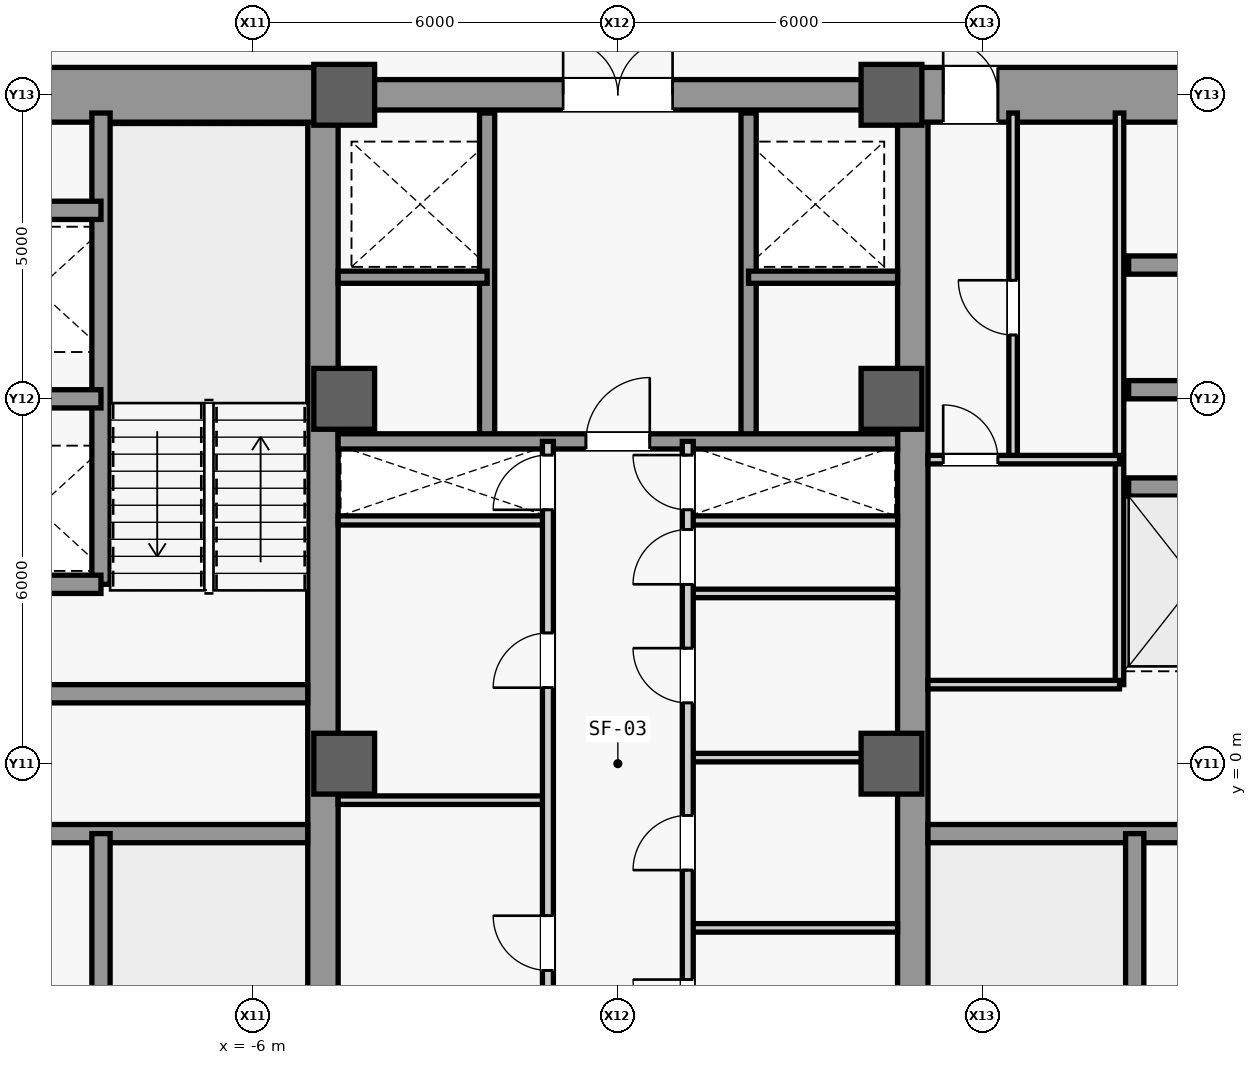
"""IFC4 building model, lengths in metres.
Left out: names, types, materials, properties, quantities, classifications, styles, units other than length and angle.
Written with IfcOpenShell. Run it as: python <this file> out.ifc"""

import sys

from ifc_helpers import new_model, si_unit, direction, frame, frame_2d, origin, origin_2d, place, context, subcontext, project, spatial, rectangle, extrude, source, transform, mapped, element, fill, save


model = new_model("IFC4")
c1 = context("Model", 3, precision=1e-05, world=origin(), true_north=direction((0.0, 1.0)))
c2 = subcontext(c1, "Body", "Model", "MODEL_VIEW")
j1 = project(units=[si_unit("LENGTHUNIT", "METRE"), si_unit("PLANEANGLEUNIT", "RADIAN")], contexts=[c1])
p1 = place(None, origin())
s1 = spatial("IfcSite", under=j1, at=p1, CompositionType="ELEMENT")
p2 = place(p1, origin())
s2 = spatial("IfcBuilding", under=s1, at=p2, CompositionType="ELEMENT")
p3 = place(p2, frame((0.0, 0.0, 70.4)))
s3 = spatial("IfcBuildingStorey", under=s2, at=p3, CompositionType="ELEMENT", Elevation=70.4)
m1 = source(origin(), c2, "Body", "SweptSolid", [
    extrude(rectangle(XDim=21.4, YDim=0.5, at=frame_2d((10.7, 0.0))), origin(), (0.0, 0.0, 1.0), 3.94),
])
for number, where, z_axis, x_axis in (
    (1, (-4.85, -10.7, 0.0), (0.0, 0.0, 1.0), (0.0, 1.0, 0.0)),
    (2, (4.85, -10.7, 0.0), (0.0, 0.0, 1.0), (0.0, 1.0, 0.0)),
):
    element("IfcWall", number, at=place(p3, frame(where, z_axis=z_axis, x_axis=x_axis)), inside=s3, PredefinedType="SHEAR", context=c2, shape_type="MappedRepresentation", body=[
        mapped(m1, transform((0.0, 0.0, 0.0), scale=1.0)),
    ])
m2 = source(origin(), c2, "Body", "SweptSolid", [
    extrude(rectangle(XDim=5.85, YDim=0.9, at=frame_2d((2.925, 0.0))), origin(), (0.0, 0.0, 1.0), 3.94),
])
p4 = place(p3, frame((-10.7, 11.0, 0.0), z_axis=(0.0, 0.0, 1.0), x_axis=(1.0, 0.0, 0.0)))
e3 = element("IfcWall", 3, at=p4, inside=s3, PredefinedType="SHEAR", context=c2, shape_type="MappedRepresentation", body=[
    mapped(m2, transform((0.0, 0.0, 0.0), scale=1.0)),
])
p5 = place(p3, frame((4.85, 11.0, 0.0), z_axis=(0.0, 0.0, 1.0), x_axis=(1.0, 0.0, 0.0)))
e4 = element("IfcWall", 4, at=p5, inside=s3, PredefinedType="SHEAR", context=c2, shape_type="MappedRepresentation", body=[
    mapped(m2, transform((0.0, 0.0, 0.0), scale=1.0)),
])
m3 = source(origin(), c2, "Body", "SweptSolid", [
    extrude(rectangle(XDim=0.9, YDim=2.15, at=frame_2d((0.45, 1.075))), frame((0.0, 0.46, 0.0), z_axis=(0.0, -1.0, 0.0), x_axis=(1.0, 0.0, 0.0)), (0.0, 0.0, 1.0), 0.92),
])
p6 = place(p5, frame((0.5, 0.0, 0.0)))
e5 = element("IfcOpeningElement", 5, at=p6, cuts=e4, PredefinedType="OPENING", context=c2, shape_type="MappedRepresentation", body=[
    mapped(m3, transform((0.0, 0.0, 0.0), scale=1.0)),
])
m4 = source(origin(), c2, "Body", "SweptSolid", [
    extrude(rectangle(XDim=5.6, YDim=0.3, at=frame_2d((2.8, 0.0))), origin(), (0.0, 0.0, 1.0), 3.94),
])
for number, where, z_axis, x_axis in (
    (6, (-10.7, -1.15, 0.0), (0.0, 0.0, 1.0), (1.0, 0.0, 0.0)),
    (7, (-10.7, 1.15, 0.0), (0.0, 0.0, 1.0), (1.0, 0.0, 0.0)),
    (8, (5.1, -1.15, 0.0), (0.0, 0.0, 1.0), (1.0, 0.0, 0.0)),
):
    element("IfcWall", number, at=place(p3, frame(where, z_axis=z_axis, x_axis=x_axis)), inside=s3, PredefinedType="SHEAR", context=c2, shape_type="MappedRepresentation", body=[
        mapped(m4, transform((0.0, 0.0, 0.0), scale=1.0)),
    ])
m5 = source(origin(), c2, "Body", "SweptSolid", [
    extrude(rectangle(XDim=9.2, YDim=0.5, at=frame_2d((4.6, 0.0))), origin(), (0.0, 0.0, 1.0), 3.94),
])
p7 = place(p3, frame((-4.6, 11.0, 0.0), z_axis=(0.0, 0.0, 1.0), x_axis=(1.0, 0.0, 0.0)))
e9 = element("IfcWall", 9, at=p7, inside=s3, PredefinedType="SHEAR", context=c2, shape_type="MappedRepresentation", body=[
    mapped(m5, transform((0.0, 0.0, 0.0), scale=1.0)),
])
m6 = source(origin(), c2, "Body", "SweptSolid", [
    extrude(rectangle(XDim=1.8, YDim=2.25, at=frame_2d((0.9, 1.125))), frame((0.0, 0.26, 0.0), z_axis=(0.0, -1.0, 0.0), x_axis=(1.0, 0.0, 0.0)), (0.0, 0.0, 1.0), 0.52),
])
p8 = place(p7, frame((3.7, 0.0, 0.0)))
e10 = element("IfcOpeningElement", 10, at=p8, cuts=e9, PredefinedType="OPENING", context=c2, shape_type="MappedRepresentation", body=[
    mapped(m6, transform((0.0, 0.0, 0.0), scale=1.0)),
])
m7 = source(origin(), c2, "Body", "SweptSolid", [
    extrude(rectangle(XDim=1.0, YDim=1.0, at=origin_2d()), origin(), (0.0, 0.0, 1.0), 4.2),
])
for number, where, z_axis, x_axis in (
    (11, (-4.5, 0.0, 0.0), (0.0, 0.0, 1.0), (1.0, 0.0, 0.0)),
    (12, (-4.5, 6.0, 0.0), (0.0, 0.0, 1.0), (1.0, 0.0, 0.0)),
    (13, (-4.5, 11.0, 0.0), (0.0, 0.0, 1.0), (1.0, 0.0, 0.0)),
    (14, (4.5, 0.0, 0.0), (0.0, 0.0, 1.0), (1.0, 0.0, 0.0)),
    (15, (4.5, 6.0, 0.0), (0.0, 0.0, 1.0), (1.0, 0.0, 0.0)),
    (16, (4.5, 11.0, 0.0), (0.0, 0.0, 1.0), (1.0, 0.0, 0.0)),
):
    element("IfcColumn", number, at=place(p3, frame(where, z_axis=z_axis, x_axis=x_axis)), inside=s3, PredefinedType="COLUMN", context=c2, shape_type="MappedRepresentation", body=[
        mapped(m7, transform((0.0, 0.0, 0.0), scale=1.0)),
    ])
m8 = source(origin(), c2, "Body", "SweptSolid", [
    extrude(rectangle(XDim=7.8, YDim=0.3, at=frame_2d((3.9, 0.0))), origin(), (0.0, 0.0, 1.0), 3.94),
])
p9 = place(p3, frame((-8.5, -8.95, 0.0), z_axis=(0.0, 0.0, 1.0), x_axis=(0.0, 1.0, 0.0)))
e17 = element("IfcWall", 17, at=p9, inside=s3, PredefinedType="SHEAR", context=c2, shape_type="MappedRepresentation", body=[
    mapped(m8, transform((0.0, 0.0, 0.0), scale=1.0)),
])
m9 = source(origin(), c2, "Body", "SweptSolid", [
    extrude(rectangle(XDim=7.75, YDim=0.3, at=frame_2d((3.875, 0.0))), origin(), (0.0, 0.0, 1.0), 3.94),
])
p10 = place(p3, frame((-8.5, 2.95, 0.0), z_axis=(0.0, 0.0, 1.0), x_axis=(0.0, 1.0, 0.0)))
e18 = element("IfcWall", 18, at=p10, inside=s3, PredefinedType="SHEAR", context=c2, shape_type="MappedRepresentation", body=[
    mapped(m9, transform((0.0, 0.0, 0.0), scale=1.0)),
])
m10 = source(origin(), c2, "Body", "SweptSolid", [
    extrude(rectangle(XDim=2.2, YDim=0.3, at=frame_2d((1.1, 0.0))), origin(), (0.0, 0.0, 1.0), 3.94),
])
for number, where, z_axis, x_axis in (
    (19, (-10.7, 2.95, 0.0), (0.0, 0.0, 1.0), (1.0, 0.0, 0.0)),
    (20, (-10.7, 6.0, 0.0), (0.0, 0.0, 1.0), (1.0, 0.0, 0.0)),
    (21, (-10.7, 9.1, 0.0), (0.0, 0.0, 1.0), (1.0, 0.0, 0.0)),
):
    element("IfcWall", number, at=place(p3, frame(where, z_axis=z_axis, x_axis=x_axis)), inside=s3, PredefinedType="SHEAR", context=c2, shape_type="MappedRepresentation", body=[
        mapped(m10, transform((0.0, 0.0, 0.0), scale=1.0)),
    ])
p11 = place(p3, frame((8.5, -8.95, 0.0), z_axis=(0.0, 0.0, 1.0), x_axis=(0.0, 1.0, 0.0)))
e22 = element("IfcWall", 22, at=p11, inside=s3, PredefinedType="SHEAR", context=c2, shape_type="MappedRepresentation", body=[
    mapped(m8, transform((0.0, 0.0, 0.0), scale=1.0)),
])
m11 = source(origin(), c2, "Body", "SweptSolid", [
    extrude(rectangle(XDim=2.3, YDim=0.3, at=frame_2d((1.15, 0.0))), origin(), (0.0, 0.0, 1.0), 3.94),
])
for number, where, z_axis, x_axis in (
    (23, (8.4, 4.55, 0.0), (0.0, 0.0, 1.0), (1.0, 0.0, 0.0)),
    (24, (8.4, 6.15, 0.0), (0.0, 0.0, 1.0), (1.0, 0.0, 0.0)),
    (25, (8.4, 8.2, 0.0), (0.0, 0.0, 1.0), (1.0, 0.0, 0.0)),
):
    element("IfcWall", number, at=place(p3, frame(where, z_axis=z_axis, x_axis=x_axis)), inside=s3, PredefinedType="SHEAR", context=c2, shape_type="MappedRepresentation", body=[
        mapped(m11, transform((0.0, 0.0, 0.0), scale=1.0)),
    ])
m12 = source(origin(), c2, "Body", "SweptSolid", [
    extrude(rectangle(XDim=9.4, YDim=0.14, at=frame_2d((4.7, 0.0))), origin(), (0.0, 0.0, 1.0), 3.94),
])
p12 = place(p3, frame((8.25, 1.3, 0.0), z_axis=(0.0, 0.0, 1.0), x_axis=(0.0, 1.0, 0.0)))
e26 = element("IfcWall", 26, at=p12, inside=s3, PredefinedType="PARTITIONING", context=c2, shape_type="MappedRepresentation", body=[
    mapped(m12, transform((0.0, 0.0, 0.0), scale=1.0)),
])
m13 = source(origin(), c2, "Body", "SweptSolid", [
    extrude(rectangle(XDim=3.15, YDim=0.14, at=frame_2d((1.575, 0.0))), origin(), (0.0, 0.0, 1.0), 3.94),
])
p13 = place(p3, frame((5.1, 1.3, 0.0), z_axis=(0.0, 0.0, 1.0), x_axis=(1.0, 0.0, 0.0)))
e27 = element("IfcWall", 27, at=p13, inside=s3, PredefinedType="PARTITIONING", context=c2, shape_type="MappedRepresentation", body=[
    mapped(m13, transform((0.0, 0.0, 0.0), scale=1.0)),
])
m14 = source(origin(), c2, "Body", "SweptSolid", [
    extrude(rectangle(XDim=5.7, YDim=0.14, at=frame_2d((2.85, 0.0))), origin(), (0.0, 0.0, 1.0), 3.94),
])
p14 = place(p3, frame((6.5, 5.0, 0.0), z_axis=(0.0, 0.0, 1.0), x_axis=(0.0, 1.0, 0.0)))
e28 = element("IfcWall", 28, at=p14, inside=s3, PredefinedType="PARTITIONING", context=c2, shape_type="MappedRepresentation", body=[
    mapped(m14, transform((0.0, 0.0, 0.0), scale=1.0)),
])
m15 = source(origin(), c2, "Body", "SweptSolid", [
    extrude(rectangle(XDim=0.9, YDim=2.15, at=frame_2d((0.45, 1.075))), frame((0.0, 0.08, 0.0), z_axis=(0.0, -1.0, 0.0), x_axis=(1.0, 0.0, 0.0)), (0.0, 0.0, 1.0), 0.16),
])
p15 = place(p14, frame((2.05, 0.0, 0.0)))
e29 = element("IfcOpeningElement", 29, at=p15, cuts=e28, PredefinedType="OPENING", context=c2, shape_type="MappedRepresentation", body=[
    mapped(m15, transform((0.0, 0.0, 0.0), scale=1.0)),
])
p16 = place(p3, frame((5.1, 5.0, 0.0), z_axis=(0.0, 0.0, 1.0), x_axis=(1.0, 0.0, 0.0)))
e30 = element("IfcWall", 30, at=p16, inside=s3, PredefinedType="PARTITIONING", context=c2, shape_type="MappedRepresentation", body=[
    mapped(m13, transform((0.0, 0.0, 0.0), scale=1.0)),
])
p17 = place(p16, frame((0.25, 0.0, 0.0)))
e31 = element("IfcOpeningElement", 31, at=p17, cuts=e30, PredefinedType="OPENING", context=c2, shape_type="MappedRepresentation", body=[
    mapped(m15, transform((0.0, 0.0, 0.0), scale=1.0)),
])
m16 = source(origin(), c2, "Body", "SweptSolid", [
    extrude(rectangle(XDim=3.45, YDim=0.15, at=frame_2d((1.725, 0.0))), origin(), (0.0, 0.0, 1.0), 3.94),
])
for number, where, z_axis, x_axis in (
    (32, (-4.6, 4.0, 0.0), (0.0, 0.0, 1.0), (1.0, 0.0, 0.0)),
    (33, (1.15, 4.0, 0.0), (0.0, 0.0, 1.0), (1.0, 0.0, 0.0)),
):
    element("IfcWall", number, at=place(p3, frame(where, z_axis=z_axis, x_axis=x_axis)), inside=s3, PredefinedType="PARTITIONING", context=c2, shape_type="MappedRepresentation", body=[
        mapped(m16, transform((0.0, 0.0, 0.0), scale=1.0)),
    ])
m17 = source(origin(), c2, "Body", "SweptSolid", [
    extrude(rectangle(XDim=5.4, YDim=0.25, at=frame_2d((2.7, 0.0))), origin(), (0.0, 0.0, 1.0), 3.94),
])
for number, where, z_axis, x_axis in (
    (34, (-2.15, 5.3, 0.0), (0.0, 0.0, 1.0), (0.0, 1.0, 0.0)),
    (35, (2.15, 5.3, 0.0), (0.0, 0.0, 1.0), (0.0, 1.0, 0.0)),
):
    element("IfcWall", number, at=place(p3, frame(where, z_axis=z_axis, x_axis=x_axis)), inside=s3, PredefinedType="SHEAR", context=c2, shape_type="MappedRepresentation", body=[
        mapped(m17, transform((0.0, 0.0, 0.0), scale=1.0)),
    ])
m18 = source(origin(), c2, "Body", "SweptSolid", [
    extrude(rectangle(XDim=2.45, YDim=0.2, at=frame_2d((1.225, 0.0))), origin(), (0.0, 0.0, 1.0), 3.94),
])
for number, where, z_axis, x_axis in (
    (36, (-4.6, 8.0, 0.0), (0.0, 0.0, 1.0), (1.0, 0.0, 0.0)),
    (37, (2.15, 8.0, 0.0), (0.0, 0.0, 1.0), (1.0, 0.0, 0.0)),
):
    element("IfcWall", number, at=place(p3, frame(where, z_axis=z_axis, x_axis=x_axis)), inside=s3, PredefinedType="SHEAR", context=c2, shape_type="MappedRepresentation", body=[
        mapped(m18, transform((0.0, 0.0, 0.0), scale=1.0)),
    ])
m19 = source(origin(), c2, "Body", "SweptSolid", [
    extrude(rectangle(XDim=9.2, YDim=0.25, at=frame_2d((4.6, 0.0))), origin(), (0.0, 0.0, 1.0), 3.94),
])
p18 = place(p3, frame((-4.6, 5.3, 0.0), z_axis=(0.0, 0.0, 1.0), x_axis=(1.0, 0.0, 0.0)))
e38 = element("IfcWall", 38, at=p18, inside=s3, PredefinedType="SHEAR", context=c2, shape_type="MappedRepresentation", body=[
    mapped(m19, transform((0.0, 0.0, 0.0), scale=1.0)),
])
m20 = source(origin(), c2, "Body", "SweptSolid", [
    extrude(rectangle(XDim=1.05, YDim=2.2, at=frame_2d((0.525, 1.1))), frame((0.0, 0.135, 0.0), z_axis=(0.0, -1.0, 0.0), x_axis=(1.0, 0.0, 0.0)), (0.0, 0.0, 1.0), 0.27),
])
p19 = place(p18, frame((4.075, 0.0, 0.0)))
e39 = element("IfcOpeningElement", 39, at=p19, cuts=e38, PredefinedType="OPENING", context=c2, shape_type="MappedRepresentation", body=[
    mapped(m20, transform((0.0, 0.0, 0.0), scale=1.0)),
])
m21 = source(origin(), c2, "Body", "SweptSolid", [
    extrude(rectangle(XDim=3.45, YDim=0.14, at=frame_2d((1.725, 0.0))), origin(), (0.0, 0.0, 1.0), 3.94),
])
p20 = place(p3, frame((-4.6, -0.6, 0.0), z_axis=(0.0, 0.0, 1.0), x_axis=(1.0, 0.0, 0.0)))
e40 = element("IfcWall", 40, at=p20, inside=s3, PredefinedType="PARTITIONING", context=c2, shape_type="MappedRepresentation", body=[
    mapped(m21, transform((0.0, 0.0, 0.0), scale=1.0)),
])
m22 = source(origin(), c2, "Body", "SweptSolid", [
    extrude(rectangle(XDim=10.6, YDim=0.18, at=frame_2d((5.3, 0.0))), origin(), (0.0, 0.0, 1.0), 3.94),
])
p21 = place(p3, frame((-1.15, -5.3, 0.0), z_axis=(0.0, 0.0, 1.0), x_axis=(0.0, 1.0, 0.0)))
e41 = element("IfcWall", 41, at=p21, inside=s3, PredefinedType="PARTITIONING", context=c2, shape_type="MappedRepresentation", body=[
    mapped(m22, transform((0.0, 0.0, 0.0), scale=1.0)),
])
m23 = source(origin(), c2, "Body", "SweptSolid", [
    extrude(rectangle(XDim=0.9, YDim=2.15, at=frame_2d((0.45, 1.075))), frame((0.0, 0.1, 0.0), z_axis=(0.0, -1.0, 0.0), x_axis=(1.0, 0.0, 0.0)), (0.0, 0.0, 1.0), 0.2),
])
p22 = place(p21, frame((1.9, 0.0, 0.0)))
e42 = element("IfcOpeningElement", 42, at=p22, cuts=e41, PredefinedType="OPENING", context=c2, shape_type="MappedRepresentation", body=[
    mapped(m23, transform((0.0, 0.0, 0.0), scale=1.0)),
])
p23 = place(p21, frame((6.55, 0.0, 0.0)))
e43 = element("IfcOpeningElement", 43, at=p23, cuts=e41, PredefinedType="OPENING", context=c2, shape_type="MappedRepresentation", body=[
    mapped(m23, transform((0.0, 0.0, 0.0), scale=1.0)),
])
p24 = place(p21, frame((9.475, 0.0, 0.0)))
e44 = element("IfcOpeningElement", 44, at=p24, cuts=e41, PredefinedType="OPENING", context=c2, shape_type="MappedRepresentation", body=[
    mapped(m23, transform((0.0, 0.0, 0.0), scale=1.0)),
])
p25 = place(p3, frame((1.15, -2.7, 0.0), z_axis=(0.0, 0.0, 1.0), x_axis=(1.0, 0.0, 0.0)))
e45 = element("IfcWall", 45, at=p25, inside=s3, PredefinedType="PARTITIONING", context=c2, shape_type="MappedRepresentation", body=[
    mapped(m21, transform((0.0, 0.0, 0.0), scale=1.0)),
])
m24 = source(origin(), c2, "Body", "SweptSolid", [
    extrude(rectangle(XDim=3.45, YDim=0.14, at=frame_2d((1.725, 0.0))), origin(), (0.0, 0.0, 1.0), 3.245),
])
p26 = place(p3, frame((1.15, 0.1, 0.0), z_axis=(0.0, 0.0, 1.0), x_axis=(1.0, 0.0, 0.0)))
e46 = element("IfcWall", 46, at=p26, inside=s3, PredefinedType="PARTITIONING", context=c2, shape_type="MappedRepresentation", body=[
    mapped(m24, transform((0.0, 0.0, 0.0), scale=1.0)),
])
p27 = place(p3, frame((1.15, 2.8, 0.0), z_axis=(0.0, 0.0, 1.0), x_axis=(1.0, 0.0, 0.0)))
e47 = element("IfcWall", 47, at=p27, inside=s3, PredefinedType="PARTITIONING", context=c2, shape_type="MappedRepresentation", body=[
    mapped(m21, transform((0.0, 0.0, 0.0), scale=1.0)),
])
p28 = place(p3, frame((1.15, -5.3, 0.0), z_axis=(0.0, 0.0, 1.0), x_axis=(0.0, 1.0, 0.0)))
e48 = element("IfcWall", 48, at=p28, inside=s3, PredefinedType="PARTITIONING", context=c2, shape_type="MappedRepresentation", body=[
    mapped(m22, transform((0.0, 0.0, 0.0), scale=1.0)),
])
p29 = place(p28, frame((0.85, 0.0, 0.0)))
e49 = element("IfcOpeningElement", 49, at=p29, cuts=e48, PredefinedType="OPENING", context=c2, shape_type="MappedRepresentation", body=[
    mapped(m23, transform((0.0, 0.0, 0.0), scale=1.0)),
])
p30 = place(p28, frame((3.55, 0.0, 0.0)))
e50 = element("IfcOpeningElement", 50, at=p30, cuts=e48, PredefinedType="OPENING", context=c2, shape_type="MappedRepresentation", body=[
    mapped(m23, transform((0.0, 0.0, 0.0), scale=1.0)),
])
p31 = place(p28, frame((6.3, 0.0, 0.0)))
e51 = element("IfcOpeningElement", 51, at=p31, cuts=e48, PredefinedType="OPENING", context=c2, shape_type="MappedRepresentation", body=[
    mapped(m23, transform((0.0, 0.0, 0.0), scale=1.0)),
])
p32 = place(p28, frame((8.25, 0.0, 0.0)))
e52 = element("IfcOpeningElement", 52, at=p32, cuts=e48, PredefinedType="OPENING", context=c2, shape_type="MappedRepresentation", body=[
    mapped(m23, transform((0.0, 0.0, 0.0), scale=1.0)),
])
p33 = place(p28, frame((9.475, 0.0, 0.0)))
e53 = element("IfcOpeningElement", 53, at=p33, cuts=e48, PredefinedType="OPENING", context=c2, shape_type="MappedRepresentation", body=[
    mapped(m23, transform((0.0, 0.0, 0.0), scale=1.0)),
])
m25 = source(origin(), c2, "Body", "SweptSolid", [
    extrude(rectangle(XDim=0.9, YDim=2.15, at=frame_2d((0.45, 1.075))), frame((0.0, 0.025, 0.0), z_axis=(0.0, -1.0, 0.0), x_axis=(1.0, 0.0, 0.0)), (0.0, 0.0, 1.0), 0.05),
])
p34 = place(p6, origin())
e54 = element("IfcDoor", 54, at=p34, inside=s3, OperationType="SINGLE_SWING_LEFT", PredefinedType="DOOR", context=c2, shape_type="MappedRepresentation", body=[
    mapped(m25, transform((0.0, 0.0, 0.0), scale=1.0)),
])
fill(e5, e54)
p35 = place(p15, origin())
e55 = element("IfcDoor", 55, at=p35, inside=s3, OperationType="SINGLE_SWING_RIGHT", PredefinedType="DOOR", context=c2, shape_type="MappedRepresentation", body=[
    mapped(m25, transform((0.0, 0.0, 0.0), scale=1.0)),
])
fill(e29, e55)
p36 = place(p17, origin())
e56 = element("IfcDoor", 56, at=p36, inside=s3, OperationType="SINGLE_SWING_LEFT", PredefinedType="DOOR", context=c2, shape_type="MappedRepresentation", body=[
    mapped(m25, transform((0.0, 0.0, 0.0), scale=1.0)),
])
fill(e31, e56)
m26 = source(origin(), c2, "Body", "SweptSolid", [
    extrude(rectangle(XDim=1.05, YDim=2.2, at=frame_2d((0.525, 1.1))), frame((0.0, 0.025, 0.0), z_axis=(0.0, -1.0, 0.0), x_axis=(1.0, 0.0, 0.0)), (0.0, 0.0, 1.0), 0.05),
])
p37 = place(p19, origin())
e57 = element("IfcDoor", 57, at=p37, inside=s3, OperationType="SINGLE_SWING_RIGHT", PredefinedType="DOOR", context=c2, shape_type="MappedRepresentation", body=[
    mapped(m26, transform((0.0, 0.0, 0.0), scale=1.0)),
])
fill(e39, e57)
m27 = source(origin(), c2, "Body", "SweptSolid", [
    extrude(rectangle(XDim=1.8, YDim=2.25, at=frame_2d((0.9, 1.125))), frame((0.0, 0.025, 0.0), z_axis=(0.0, -1.0, 0.0), x_axis=(1.0, 0.0, 0.0)), (0.0, 0.0, 1.0), 0.05),
])
p38 = place(p8, origin())
e58 = element("IfcDoor", 58, at=p38, inside=s3, OperationType="SINGLE_SWING_RIGHT", PredefinedType="DOOR", context=c2, shape_type="MappedRepresentation", body=[
    mapped(m27, transform((0.0, 0.0, 0.0), scale=1.0)),
])
fill(e10, e58)
p39 = place(p22, origin())
e59 = element("IfcDoor", 59, at=p39, inside=s3, OperationType="SINGLE_SWING_RIGHT", PredefinedType="DOOR", context=c2, shape_type="MappedRepresentation", body=[
    mapped(m25, transform((0.0, 0.0, 0.0), scale=1.0)),
])
fill(e42, e59)
p40 = place(p23, origin())
e60 = element("IfcDoor", 60, at=p40, inside=s3, OperationType="SINGLE_SWING_LEFT", PredefinedType="DOOR", context=c2, shape_type="MappedRepresentation", body=[
    mapped(m25, transform((0.0, 0.0, 0.0), scale=1.0)),
])
fill(e43, e60)
p41 = place(p29, origin())
e61 = element("IfcDoor", 61, at=p41, inside=s3, OperationType="SINGLE_SWING_RIGHT", PredefinedType="DOOR", context=c2, shape_type="MappedRepresentation", body=[
    mapped(m25, transform((0.0, 0.0, 0.0), scale=1.0)),
])
fill(e49, e61)
p42 = place(p30, origin())
e62 = element("IfcDoor", 62, at=p42, inside=s3, OperationType="SINGLE_SWING_LEFT", PredefinedType="DOOR", context=c2, shape_type="MappedRepresentation", body=[
    mapped(m25, transform((0.0, 0.0, 0.0), scale=1.0)),
])
fill(e50, e62)
p43 = place(p31, origin())
e63 = element("IfcDoor", 63, at=p43, inside=s3, OperationType="SINGLE_SWING_RIGHT", PredefinedType="DOOR", context=c2, shape_type="MappedRepresentation", body=[
    mapped(m25, transform((0.0, 0.0, 0.0), scale=1.0)),
])
fill(e51, e63)
p44 = place(p32, origin())
e64 = element("IfcDoor", 64, at=p44, inside=s3, OperationType="SINGLE_SWING_LEFT", PredefinedType="DOOR", context=c2, shape_type="MappedRepresentation", body=[
    mapped(m25, transform((0.0, 0.0, 0.0), scale=1.0)),
])
fill(e52, e64)
p45 = place(p24, origin())
e65 = element("IfcDoor", 65, at=p45, inside=s3, OperationType="SINGLE_SWING_LEFT", PredefinedType="DOOR", context=c2, shape_type="MappedRepresentation", body=[
    mapped(m25, transform((0.0, 0.0, 0.0), scale=1.0)),
])
fill(e44, e65)
p46 = place(p33, origin())
e66 = element("IfcDoor", 66, at=p46, inside=s3, OperationType="SINGLE_SWING_RIGHT", PredefinedType="DOOR", context=c2, shape_type="MappedRepresentation", body=[
    mapped(m25, transform((0.0, 0.0, 0.0), scale=1.0)),
])
fill(e53, e66)
save(model, sys.argv[1])
